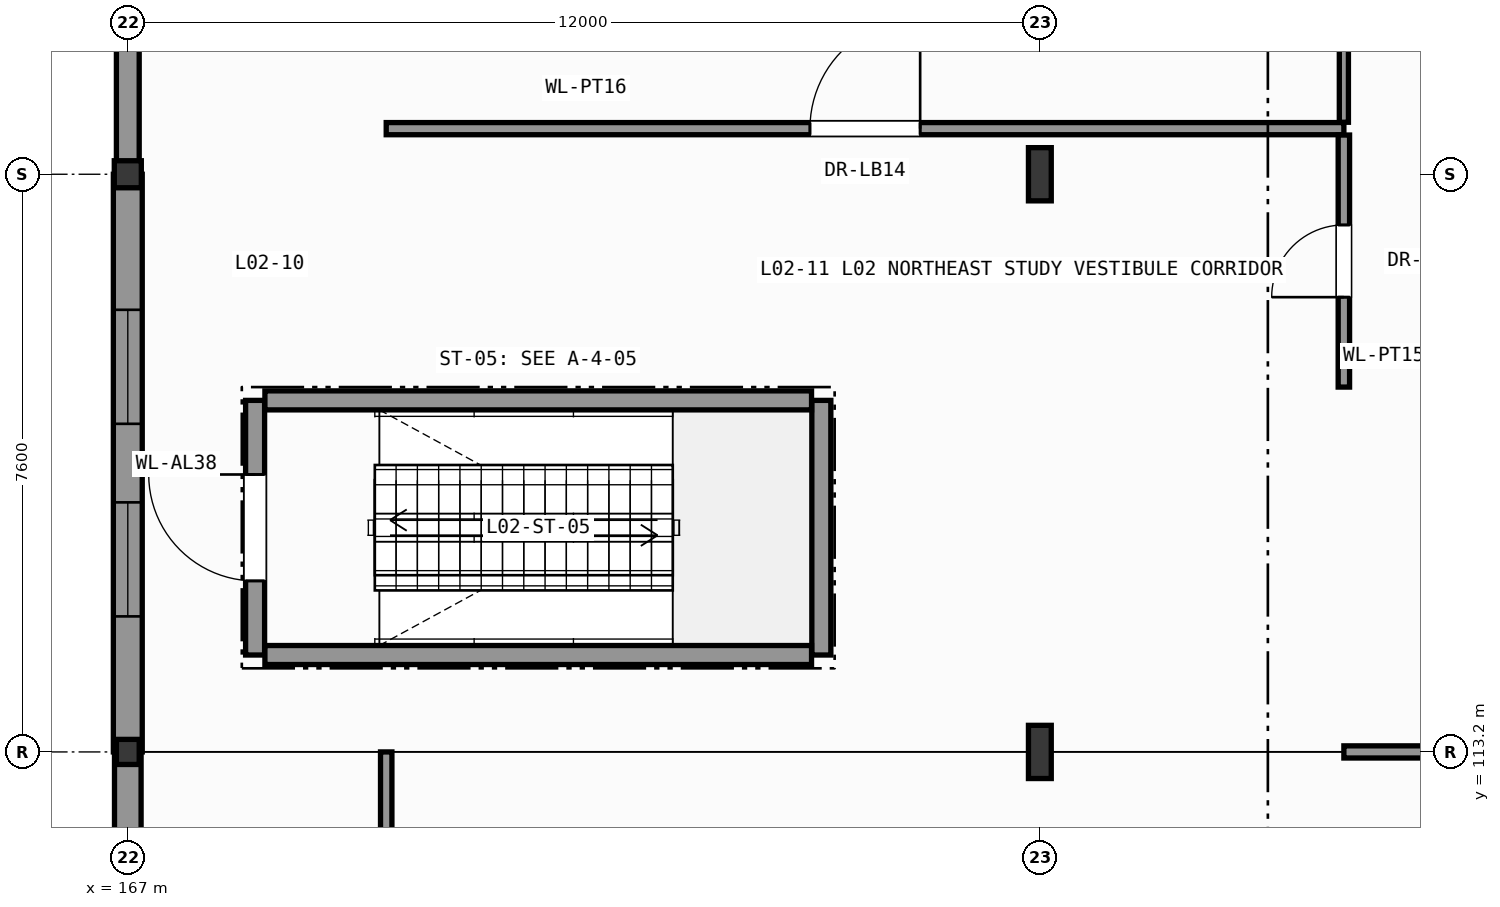
"""IFC4 building model, lengths in metres.
Left out: names, types, materials, properties, quantities, classifications, styles, units other than length and angle.
Written with IfcOpenShell. Run it as: python <this file> out.ifc"""

import sys

from ifc_helpers import new_model, si_unit, direction, frame, frame_2d, origin, origin_2d, place, context, subcontext, project, spatial, rectangle, hollow_circle, i_section, extrude, element, fill, save


model = new_model("IFC4")
c1 = context("Model", 3, precision=1e-05, world=origin(), true_north=direction((0.0, 1.0)))
c2 = subcontext(c1, "Body", "Model", "MODEL_VIEW")
j1 = project(units=[si_unit("LENGTHUNIT", "METRE"), si_unit("PLANEANGLEUNIT", "RADIAN")], contexts=[c1])
p1 = place(None, origin())
s1 = spatial("IfcSite", under=j1, at=p1, CompositionType="ELEMENT")
p2 = place(p1, origin())
s2 = spatial("IfcBuilding", under=s1, at=p2, CompositionType="ELEMENT")
p3 = place(p2, frame((0.0, 0.0, 7.8)))
s3 = spatial("IfcBuildingStorey", under=s2, at=p3, CompositionType="ELEMENT", Elevation=7.8)
p4 = place(p3, frame((167.0, 113.2, 0.0), z_axis=(0.0, 0.0, 1.0), x_axis=(1.0, 0.0, 0.0)))
e1 = element("IfcColumn", 1, at=p4, inside=s3, PredefinedType="COLUMN", context=c2, shape_type="SweptSolid", body=[
    extrude(i_section(OverallWidth=0.3, OverallDepth=0.33, WebThickness=0.01, FlangeThickness=0.017, FilletRadius=0.027, at=origin_2d()), origin(), (0.0, 0.0, 1.0), 5.4),
])
p5 = place(p3, frame((167.0, 120.8, 0.0), z_axis=(0.0, 0.0, 1.0), x_axis=(1.0, 0.0, 0.0)))
e2 = element("IfcColumn", 2, at=p5, inside=s3, PredefinedType="COLUMN", context=c2, shape_type="SweptSolid", body=[
    extrude(hollow_circle(Radius=0.178, WallThickness=0.016, at=origin_2d()), origin(), (0.0, 0.0, 1.0), 5.4),
])
for number, where, z_axis, x_axis in (
    (3, (179.0, 113.2, 0.0), (0.0, 0.0, 1.0), (1.0, 0.0, 0.0)),
    (4, (179.0, 120.8, 0.0), (0.0, 0.0, 1.0), (1.0, 0.0, 0.0)),
):
    element("IfcColumn", number, at=place(p3, frame(where, z_axis=z_axis, x_axis=x_axis)), inside=s3, PredefinedType="COLUMN", context=c2, shape_type="SweptSolid", body=[
        extrude(i_section(OverallWidth=0.3, OverallDepth=0.7, WebThickness=0.017, FlangeThickness=0.032, FilletRadius=0.027, at=origin_2d()), origin(), (0.0, 0.0, 1.0), 5.4),
    ])
p6 = place(p3, frame((167.0, 120.8, 0.0), z_axis=(0.0, 0.0, 1.0), x_axis=(0.0, 1.0, 0.0)))
e5 = element("IfcWall", 5, at=p6, inside=s3, PredefinedType="SOLIDWALL", context=c2, shape_type="SweptSolid", body=[
    extrude(rectangle(XDim=7.6, YDim=0.3, at=frame_2d((3.8, 0.0))), origin(), (0.0, 0.0, 1.0), 4.815),
])
p7 = place(p6, frame((1.633, 0.0, 0.95)))
e6 = element("IfcOpeningElement", 6, at=p7, cuts=e5, PredefinedType="OPENING", context=c2, shape_type="SweptSolid", body=[
    extrude(rectangle(XDim=1.8, YDim=2.6, at=frame_2d((0.9, 1.3))), frame((0.0, 0.16, 0.0), z_axis=(0.0, -1.0, 0.0), x_axis=(1.0, 0.0, 0.0)), (0.0, 0.0, 1.0), 0.32),
])
p8 = place(p6, frame((4.167, 0.0, 0.95)))
e7 = element("IfcOpeningElement", 7, at=p8, cuts=e5, PredefinedType="OPENING", context=c2, shape_type="SweptSolid", body=[
    extrude(rectangle(XDim=1.8, YDim=2.6, at=frame_2d((0.9, 1.3))), frame((0.0, 0.16, 0.0), z_axis=(0.0, -1.0, 0.0), x_axis=(1.0, 0.0, 0.0)), (0.0, 0.0, 1.0), 0.32),
])
p9 = place(p3, frame((167.0, 113.2, 0.0), z_axis=(0.0, 0.0, 1.0), x_axis=(0.0, 1.0, 0.0)))
e8 = element("IfcWall", 8, at=p9, inside=s3, PredefinedType="SOLIDWALL", context=c2, shape_type="SweptSolid", body=[
    extrude(rectangle(XDim=7.6, YDim=0.38, at=frame_2d((3.8, 0.0))), origin(), (0.0, 0.0, 1.0), 4.815),
])
p10 = place(p9, frame((1.783, 0.0, 0.95)))
e9 = element("IfcOpeningElement", 9, at=p10, cuts=e8, PredefinedType="OPENING", context=c2, shape_type="SweptSolid", body=[
    extrude(rectangle(XDim=1.5, YDim=2.4, at=frame_2d((0.75, 1.2))), frame((0.0, 0.2, 0.0), z_axis=(0.0, -1.0, 0.0), x_axis=(1.0, 0.0, 0.0)), (0.0, 0.0, 1.0), 0.4),
])
p11 = place(p9, frame((4.317, 0.0, 0.95)))
e10 = element("IfcOpeningElement", 10, at=p11, cuts=e8, PredefinedType="OPENING", context=c2, shape_type="SweptSolid", body=[
    extrude(rectangle(XDim=1.5, YDim=2.4, at=frame_2d((0.75, 1.2))), frame((0.0, 0.2, 0.0), z_axis=(0.0, -1.0, 0.0), x_axis=(1.0, 0.0, 0.0)), (0.0, 0.0, 1.0), 0.4),
])
p12 = place(p3, frame((167.0, 105.6, 0.0), z_axis=(0.0, 0.0, 1.0), x_axis=(0.0, 1.0, 0.0)))
e11 = element("IfcWall", 11, at=p12, inside=s3, PredefinedType="SOLIDWALL", context=c2, shape_type="SweptSolid", body=[
    extrude(rectangle(XDim=7.6, YDim=0.35, at=frame_2d((3.8, 0.0))), origin(), (0.0, 0.0, 1.0), 4.815),
])
p13 = place(p12, frame((1.483, 0.0, 0.95)))
e12 = element("IfcOpeningElement", 12, at=p13, cuts=e11, PredefinedType="OPENING", context=c2, shape_type="SweptSolid", body=[
    extrude(rectangle(XDim=2.1, YDim=2.8, at=frame_2d((1.05, 1.4))), frame((0.0, 0.185, 0.0), z_axis=(0.0, -1.0, 0.0), x_axis=(1.0, 0.0, 0.0)), (0.0, 0.0, 1.0), 0.37),
])
p14 = place(p12, frame((4.017, 0.0, 0.95)))
e13 = element("IfcOpeningElement", 13, at=p14, cuts=e11, PredefinedType="OPENING", context=c2, shape_type="SweptSolid", body=[
    extrude(rectangle(XDim=2.1, YDim=2.8, at=frame_2d((1.05, 1.4))), frame((0.0, 0.185, 0.0), z_axis=(0.0, -1.0, 0.0), x_axis=(1.0, 0.0, 0.0)), (0.0, 0.0, 1.0), 0.37),
])
p15 = place(p3, frame((168.675, 114.475, 0.0), z_axis=(0.0, 0.0, 1.0), x_axis=(0.0, 1.0, 0.0)))
e14 = element("IfcWall", 14, at=p15, inside=s3, PredefinedType="SHEAR", context=c2, shape_type="SweptSolid", body=[
    extrude(rectangle(XDim=3.35, YDim=0.25, at=frame_2d((1.675, 0.0))), origin(), (0.0, 0.0, 1.0), 5.15),
])
p16 = place(p15, frame((0.975, 0.0, 0.0)))
e15 = element("IfcOpeningElement", 15, at=p16, cuts=e14, PredefinedType="OPENING", context=c2, shape_type="SweptSolid", body=[
    extrude(rectangle(XDim=1.4, YDim=2.2, at=frame_2d((0.7, 1.1))), frame((0.0, 0.135, 0.0), z_axis=(0.0, -1.0, 0.0), x_axis=(1.0, 0.0, 0.0)), (0.0, 0.0, 1.0), 0.27),
])
p17 = place(p3, frame((176.125, 114.475, 0.0), z_axis=(0.0, 0.0, 1.0), x_axis=(0.0, 1.0, 0.0)))
e16 = element("IfcWall", 16, at=p17, inside=s3, PredefinedType="SHEAR", context=c2, shape_type="SweptSolid", body=[
    extrude(rectangle(XDim=3.35, YDim=0.25, at=frame_2d((1.675, 0.0))), origin(), (0.0, 0.0, 1.0), 5.15),
])
for number, where, z_axis, x_axis in (
    (17, (168.804, 114.475, 0.0), (0.0, 0.0, 1.0), (1.0, 0.0, 0.0)),
    (18, (168.804, 117.825, 0.0), (0.0, 0.0, 1.0), (1.0, 0.0, 0.0)),
):
    element("IfcWall", number, at=place(p3, frame(where, z_axis=z_axis, x_axis=x_axis)), inside=s3, PredefinedType="SHEAR", context=c2, shape_type="SweptSolid", body=[
        extrude(rectangle(XDim=7.192, YDim=0.25, at=frame_2d((3.596, 0.0))), origin(), (0.0, 0.0, 1.0), 5.15),
    ])
p18 = place(p3, frame((170.4, 121.4, 0.0), z_axis=(0.0, 0.0, 1.0), x_axis=(1.0, 0.0, 0.0)))
e19 = element("IfcWall", 19, at=p18, inside=s3, PredefinedType="PARTITIONING", context=c2, shape_type="SweptSolid", body=[
    extrude(rectangle(XDim=12.6, YDim=0.16, at=frame_2d((6.3, 0.0))), origin(), (0.0, 0.0, 1.0), 5.15),
])
p19 = place(p18, frame((5.575, 0.0, 0.0)))
e20 = element("IfcOpeningElement", 20, at=p19, cuts=e19, PredefinedType="OPENING", context=c2, shape_type="SweptSolid", body=[
    extrude(rectangle(XDim=1.45, YDim=2.35, at=frame_2d((0.725, 1.175))), frame((0.0, 0.09, 0.0), z_axis=(0.0, -1.0, 0.0), x_axis=(1.0, 0.0, 0.0)), (0.0, 0.0, 1.0), 0.18),
])
p20 = place(p3, frame((183.0, 118.0, 0.0), z_axis=(0.0, 0.0, 1.0), x_axis=(0.0, 1.0, 0.0)))
e21 = element("IfcWall", 21, at=p20, inside=s3, PredefinedType="PARTITIONING", context=c2, shape_type="SweptSolid", body=[
    extrude(rectangle(XDim=3.316, YDim=0.15, at=frame_2d((1.658, 0.0))), origin(), (0.0, 0.0, 1.0), 5.15),
])
p21 = place(p20, frame((1.183, 0.0, 0.0)))
e22 = element("IfcOpeningElement", 22, at=p21, cuts=e21, PredefinedType="OPENING", context=c2, shape_type="SweptSolid", body=[
    extrude(rectangle(XDim=0.95, YDim=2.1, at=frame_2d((0.475, 1.05))), frame((0.0, 0.085, 0.0), z_axis=(0.0, -1.0, 0.0), x_axis=(1.0, 0.0, 0.0)), (0.0, 0.0, 1.0), 0.17),
])
p22 = place(p3, frame((183.0, 121.484, 0.0), z_axis=(0.0, 0.0, 1.0), x_axis=(0.0, 1.0, 0.0)))
e23 = element("IfcWall", 23, at=p22, inside=s3, PredefinedType="PARTITIONING", context=c2, shape_type="SweptSolid", body=[
    extrude(rectangle(XDim=14.322, YDim=0.12, at=frame_2d((7.161, 0.0))), origin(), (0.0, 0.0, 1.0), 5.15),
])
p23 = place(p3, frame((183.0, 113.2, 0.0), z_axis=(0.0, 0.0, 1.0), x_axis=(1.0, 0.0, 0.0)))
e24 = element("IfcWall", 24, at=p23, inside=s3, PredefinedType="PARTITIONING", context=c2, shape_type="SweptSolid", body=[
    extrude(rectangle(XDim=8.636, YDim=0.16, at=frame_2d((4.318, 0.0))), origin(), (0.0, 0.0, 1.0), 3.705),
])
p24 = place(p3, frame((170.4, 86.884, 0.0), z_axis=(0.0, 0.0, 1.0), x_axis=(0.0, 1.0, 0.0)))
e25 = element("IfcWall", 25, at=p24, inside=s3, PredefinedType="PARTITIONING", context=c2, shape_type="SweptSolid", body=[
    extrude(rectangle(XDim=26.316, YDim=0.15, at=frame_2d((13.158, 0.0))), origin(), (0.0, 0.0, 1.0), 5.15),
])
p25 = place(p24, frame((12.633, 0.0, 0.0)))
e26 = element("IfcOpeningElement", 26, at=p25, cuts=e25, PredefinedType="OPENING", context=c2, shape_type="SweptSolid", body=[
    extrude(rectangle(XDim=1.05, YDim=2.2, at=frame_2d((0.525, 1.1))), frame((0.0, 0.085, 0.0), z_axis=(0.0, -1.0, 0.0), x_axis=(1.0, 0.0, 0.0)), (0.0, 0.0, 1.0), 0.17),
])
p26 = place(p10, origin())
e27 = element("IfcWindow", 27, at=p26, inside=s3, PartitioningType="SINGLE_PANEL", PredefinedType="WINDOW", context=c2, shape_type="SweptSolid", body=[
    extrude(rectangle(XDim=1.5, YDim=2.4, at=frame_2d((0.75, 1.2))), frame((0.0, 0.03, 0.0), z_axis=(0.0, -1.0, 0.0), x_axis=(1.0, 0.0, 0.0)), (0.0, 0.0, 1.0), 0.06),
])
fill(e9, e27)
p27 = place(p11, origin())
e28 = element("IfcWindow", 28, at=p27, inside=s3, PartitioningType="SINGLE_PANEL", PredefinedType="WINDOW", context=c2, shape_type="SweptSolid", body=[
    extrude(rectangle(XDim=1.5, YDim=2.4, at=frame_2d((0.75, 1.2))), frame((0.0, 0.03, 0.0), z_axis=(0.0, -1.0, 0.0), x_axis=(1.0, 0.0, 0.0)), (0.0, 0.0, 1.0), 0.06),
])
fill(e10, e28)
p28 = place(p16, origin())
e29 = element("IfcDoor", 29, at=p28, inside=s3, OperationType="SINGLE_SWING_RIGHT", PredefinedType="DOOR", context=c2, shape_type="SweptSolid", body=[
    extrude(rectangle(XDim=1.4, YDim=2.2, at=frame_2d((0.7, 1.1))), frame((0.0, 0.025, 0.0), z_axis=(0.0, -1.0, 0.0), x_axis=(1.0, 0.0, 0.0)), (0.0, 0.0, 1.0), 0.05),
])
fill(e15, e29)
p29 = place(p19, origin())
e30 = element("IfcDoor", 30, at=p29, inside=s3, OperationType="SINGLE_SWING_RIGHT", PredefinedType="DOOR", context=c2, shape_type="SweptSolid", body=[
    extrude(rectangle(XDim=1.45, YDim=2.35, at=frame_2d((0.725, 1.175))), frame((0.0, 0.025, 0.0), z_axis=(0.0, -1.0, 0.0), x_axis=(1.0, 0.0, 0.0)), (0.0, 0.0, 1.0), 0.05),
])
fill(e20, e30)
p30 = place(p21, origin())
e31 = element("IfcDoor", 31, at=p30, inside=s3, OperationType="SINGLE_SWING_LEFT", PredefinedType="DOOR", context=c2, shape_type="SweptSolid", body=[
    extrude(rectangle(XDim=0.95, YDim=2.1, at=frame_2d((0.475, 1.05))), frame((0.0, 0.025, 0.0), z_axis=(0.0, -1.0, 0.0), x_axis=(1.0, 0.0, 0.0)), (0.0, 0.0, 1.0), 0.05),
])
fill(e22, e31)
save(model, sys.argv[1])
